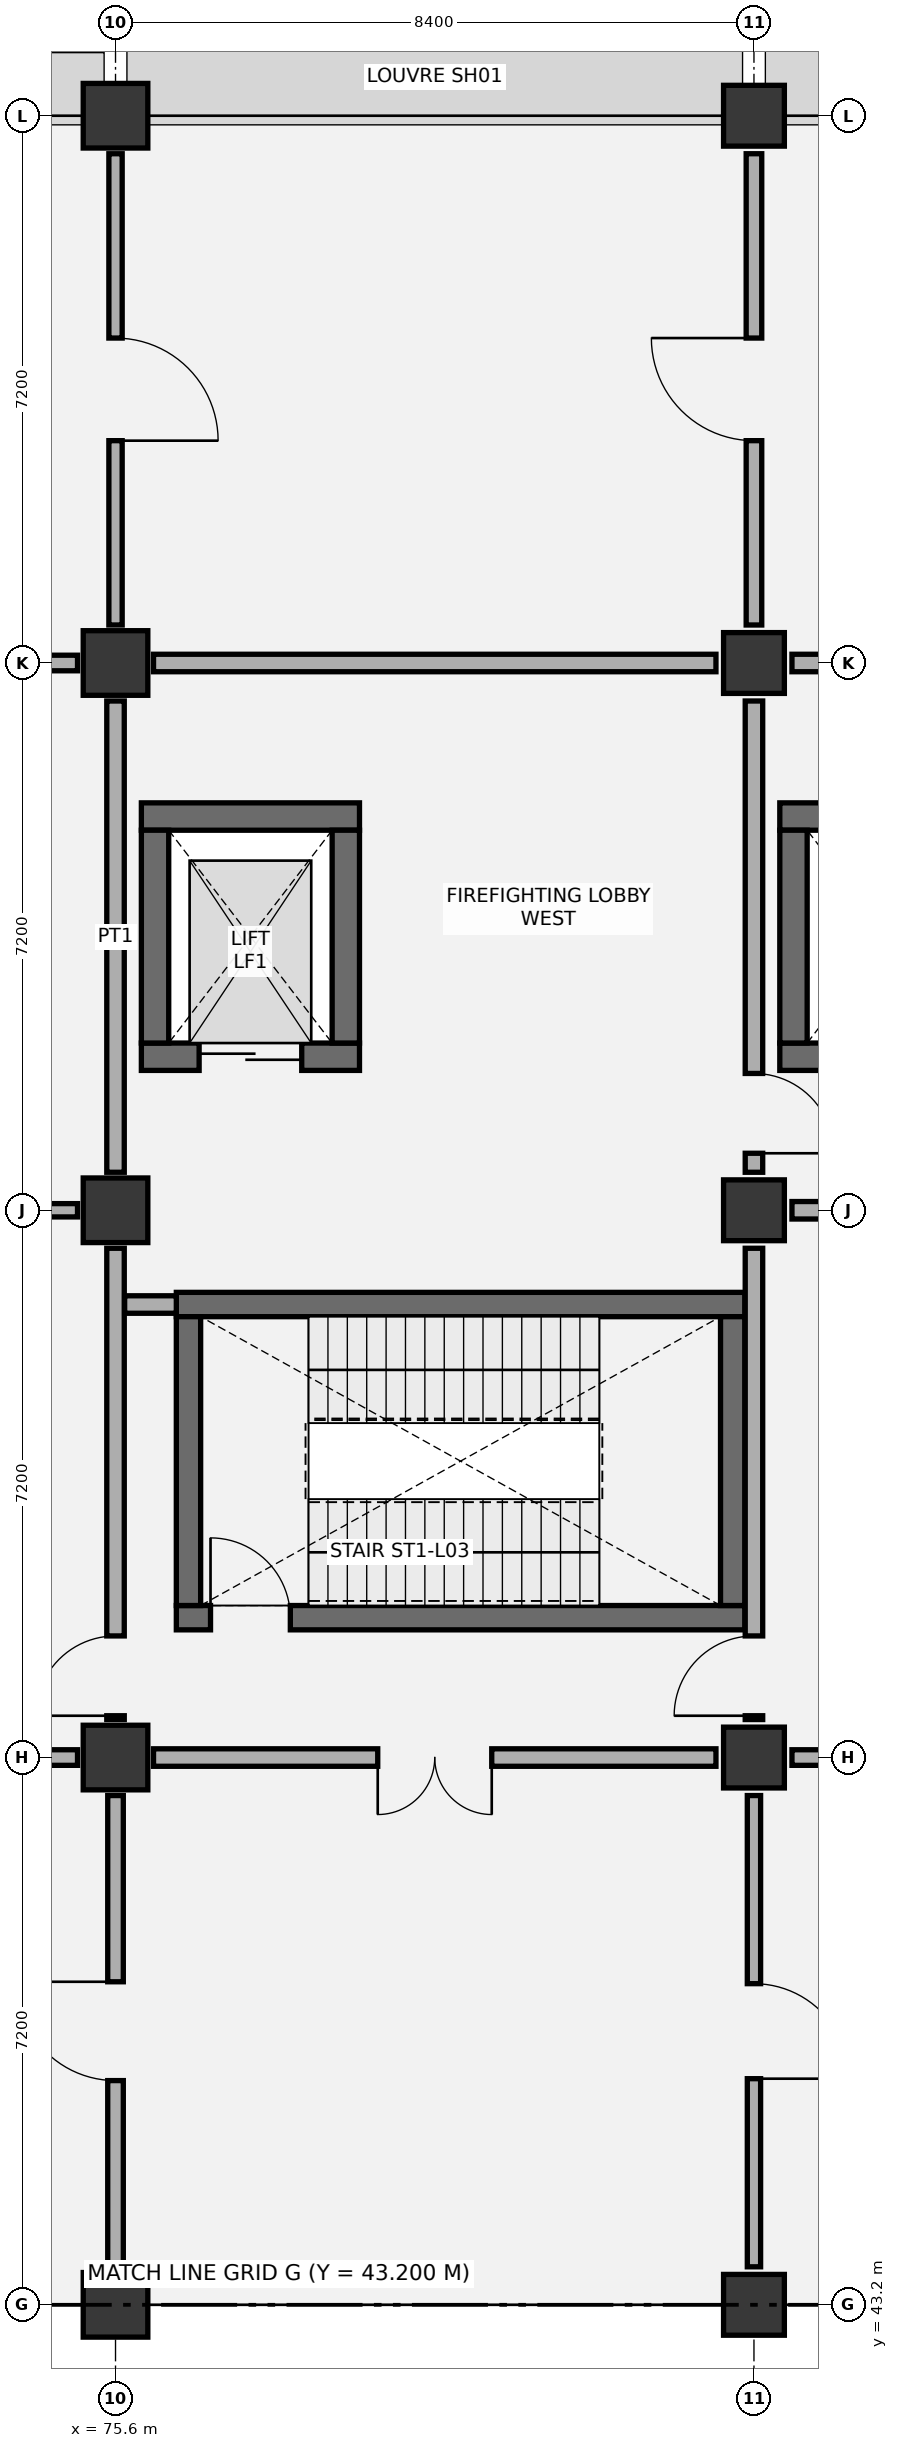
"""IFC4 building model, lengths in metres.
Left out: names, types, materials, properties, quantities, classifications, styles, units other than length and angle.
Written with IfcOpenShell. Run it as: python <this file> out.ifc"""

import sys

from ifc_helpers import new_model, si_unit, direction, frame, frame_2d, origin, origin_2d, place, context, subcontext, project, spatial, rectangle, extrude, element, fill, save


model = new_model("IFC4")
c1 = context("Model", 3, precision=1e-05, world=origin(), true_north=direction((0.0, 1.0)))
c2 = subcontext(c1, "Body", "Model", "MODEL_VIEW")
j1 = project(units=[si_unit("LENGTHUNIT", "METRE"), si_unit("PLANEANGLEUNIT", "RADIAN")], contexts=[c1])
p1 = place(None, origin())
s1 = spatial("IfcSite", under=j1, at=p1, CompositionType="ELEMENT")
p2 = place(p1, origin())
s2 = spatial("IfcBuilding", under=s1, at=p2, CompositionType="ELEMENT")
p3 = place(p2, frame((0.0, 0.0, 16.8)))
s3 = spatial("IfcBuildingStorey", under=s2, at=p3, CompositionType="ELEMENT", Elevation=16.8)
for number, where, z_axis, x_axis in (
    (1, (75.6, 43.2, 0.0), (0.0, 0.0, 1.0), (1.0, 0.0, 0.0)),
    (2, (75.6, 50.4, 0.0), (0.0, 0.0, 1.0), (1.0, 0.0, 0.0)),
    (3, (75.6, 57.6, 0.0), (0.0, 0.0, 1.0), (1.0, 0.0, 0.0)),
    (4, (75.6, 64.8, 0.0), (0.0, 0.0, 1.0), (1.0, 0.0, 0.0)),
    (5, (75.6, 72.0, 0.0), (0.0, 0.0, 1.0), (1.0, 0.0, 0.0)),
):
    element("IfcColumn", number, at=place(p3, frame(where, z_axis=z_axis, x_axis=x_axis)), inside=s3, PredefinedType="COLUMN", context=c2, shape_type="SweptSolid", body=[
        extrude(rectangle(XDim=0.85, YDim=0.85, at=origin_2d()), origin(), (0.0, 0.0, 1.0), 5.4),
    ])
for number, where, z_axis, x_axis in (
    (6, (84.0, 43.2, 0.0), (0.0, 0.0, 1.0), (1.0, 0.0, 0.0)),
    (7, (84.0, 50.4, 0.0), (0.0, 0.0, 1.0), (1.0, 0.0, 0.0)),
    (8, (84.0, 57.6, 0.0), (0.0, 0.0, 1.0), (1.0, 0.0, 0.0)),
    (9, (84.0, 64.8, 0.0), (0.0, 0.0, 1.0), (1.0, 0.0, 0.0)),
    (10, (84.0, 72.0, 0.0), (0.0, 0.0, 1.0), (1.0, 0.0, 0.0)),
):
    element("IfcColumn", number, at=place(p3, frame(where, z_axis=z_axis, x_axis=x_axis)), inside=s3, PredefinedType="COLUMN", context=c2, shape_type="SweptSolid", body=[
        extrude(rectangle(XDim=0.8, YDim=0.8, at=origin_2d()), origin(), (0.0, 0.0, 1.0), 5.4),
    ])
p4 = place(p3, frame((76.4, 52.24, 0.0), z_axis=(0.0, 0.0, 1.0), x_axis=(1.0, 0.0, 0.0)))
e11 = element("IfcWall", 11, at=p4, inside=s3, PredefinedType="SHEAR", context=c2, shape_type="SweptSolid", body=[
    extrude(rectangle(XDim=7.48, YDim=0.32, at=frame_2d((3.74, 0.0))), origin(), (0.0, 0.0, 1.0), 4.95),
])
p5 = place(p4, frame((0.45, 0.0, 0.0)))
e12 = element("IfcOpeningElement", 12, at=p5, cuts=e11, PredefinedType="OPENING", context=c2, shape_type="SweptSolid", body=[
    extrude(rectangle(XDim=1.05, YDim=2.15, at=frame_2d((0.525, 1.075))), frame((0.0, 0.17, 0.0), z_axis=(0.0, -1.0, 0.0), x_axis=(1.0, 0.0, 0.0)), (0.0, 0.0, 1.0), 0.34),
])
p6 = place(p3, frame((76.4, 56.36, 0.0), z_axis=(0.0, 0.0, 1.0), x_axis=(1.0, 0.0, 0.0)))
e13 = element("IfcWall", 13, at=p6, inside=s3, PredefinedType="SHEAR", context=c2, shape_type="SweptSolid", body=[
    extrude(rectangle(XDim=7.48, YDim=0.32, at=frame_2d((3.74, 0.0))), origin(), (0.0, 0.0, 1.0), 4.95),
])
for number, where, z_axis, x_axis in (
    (14, (76.56, 52.4, 0.0), (0.0, 0.0, 1.0), (0.0, 1.0, 0.0)),
    (15, (83.72, 52.4, 0.0), (0.0, 0.0, 1.0), (0.0, 1.0, 0.0)),
):
    element("IfcWall", number, at=place(p3, frame(where, z_axis=z_axis, x_axis=x_axis)), inside=s3, PredefinedType="SHEAR", context=c2, shape_type="SweptSolid", body=[
        extrude(rectangle(XDim=3.8, YDim=0.32, at=frame_2d((1.9, 0.0))), origin(), (0.0, 0.0, 1.0), 4.95),
    ])
p7 = place(p3, frame((75.94, 62.78, 0.0), z_axis=(0.0, 0.0, 1.0), x_axis=(1.0, 0.0, 0.0)))
e16 = element("IfcWall", 16, at=p7, inside=s3, PredefinedType="SHEAR", context=c2, shape_type="SweptSolid", body=[
    extrude(rectangle(XDim=2.87, YDim=0.36, at=frame_2d((1.435, 0.0))), origin(), (0.0, 0.0, 1.0), 4.95),
])
p8 = place(p3, frame((75.94, 59.62, 0.0), z_axis=(0.0, 0.0, 1.0), x_axis=(1.0, 0.0, 0.0)))
e17 = element("IfcWall", 17, at=p8, inside=s3, PredefinedType="SHEAR", context=c2, shape_type="SweptSolid", body=[
    extrude(rectangle(XDim=2.87, YDim=0.36, at=frame_2d((1.435, 0.0))), origin(), (0.0, 0.0, 1.0), 4.95),
])
p9 = place(p8, frame((0.76, 0.0, 0.0)))
e18 = element("IfcOpeningElement", 18, at=p9, cuts=e17, PredefinedType="OPENING", context=c2, shape_type="SweptSolid", body=[
    extrude(rectangle(XDim=1.35, YDim=2.2, at=frame_2d((0.675, 1.1))), frame((0.0, 0.19, 0.0), z_axis=(0.0, -1.0, 0.0), x_axis=(1.0, 0.0, 0.0)), (0.0, 0.0, 1.0), 0.38),
])
for number, where, z_axis, x_axis in (
    (19, (76.12, 59.8, 0.0), (0.0, 0.0, 1.0), (0.0, 1.0, 0.0)),
    (20, (78.63, 59.8, 0.0), (0.0, 0.0, 1.0), (0.0, 1.0, 0.0)),
):
    element("IfcWall", number, at=place(p3, frame(where, z_axis=z_axis, x_axis=x_axis)), inside=s3, PredefinedType="SHEAR", context=c2, shape_type="SweptSolid", body=[
        extrude(rectangle(XDim=2.8, YDim=0.36, at=frame_2d((1.4, 0.0))), origin(), (0.0, 0.0, 1.0), 4.95),
    ])
p10 = place(p3, frame((84.34, 62.78, 0.0), z_axis=(0.0, 0.0, 1.0), x_axis=(1.0, 0.0, 0.0)))
e21 = element("IfcWall", 21, at=p10, inside=s3, PredefinedType="SHEAR", context=c2, shape_type="SweptSolid", body=[
    extrude(rectangle(XDim=7.77, YDim=0.36, at=frame_2d((3.885, 0.0))), origin(), (0.0, 0.0, 1.0), 4.95),
])
p11 = place(p3, frame((84.34, 59.62, 0.0), z_axis=(0.0, 0.0, 1.0), x_axis=(1.0, 0.0, 0.0)))
e22 = element("IfcWall", 22, at=p11, inside=s3, PredefinedType="SHEAR", context=c2, shape_type="SweptSolid", body=[
    extrude(rectangle(XDim=2.66, YDim=0.36, at=frame_2d((1.33, 0.0))), origin(), (0.0, 0.0, 1.0), 4.95),
])
p12 = place(p11, frame((0.78, 0.0, 0.0)))
e23 = element("IfcOpeningElement", 23, at=p12, cuts=e22, PredefinedType="OPENING", context=c2, shape_type="SweptSolid", body=[
    extrude(rectangle(XDim=1.1, YDim=2.15, at=frame_2d((0.55, 1.075))), frame((0.0, 0.19, 0.0), z_axis=(0.0, -1.0, 0.0), x_axis=(1.0, 0.0, 0.0)), (0.0, 0.0, 1.0), 0.38),
])
p13 = place(p3, frame((84.52, 59.8, 0.0), z_axis=(0.0, 0.0, 1.0), x_axis=(0.0, 1.0, 0.0)))
e24 = element("IfcWall", 24, at=p13, inside=s3, PredefinedType="SHEAR", context=c2, shape_type="SweptSolid", body=[
    extrude(rectangle(XDim=2.8, YDim=0.36, at=frame_2d((1.4, 0.0))), origin(), (0.0, 0.0, 1.0), 4.95),
])
p14 = place(p3, frame((75.6, 43.7, 0.0), z_axis=(0.0, 0.0, 1.0), x_axis=(0.0, 1.0, 0.0)))
e25 = element("IfcWall", 25, at=p14, inside=s3, PredefinedType="PARTITIONING", context=c2, shape_type="SweptSolid", body=[
    extrude(rectangle(XDim=6.2, YDim=0.205, at=frame_2d((3.1, 0.0))), origin(), (0.0, 0.0, 1.0), 4.545),
])
p15 = place(p14, frame((2.45, 0.0, 0.0)))
e26 = element("IfcOpeningElement", 26, at=p15, cuts=e25, PredefinedType="OPENING", context=c2, shape_type="SweptSolid", body=[
    extrude(rectangle(XDim=1.3, YDim=2.15, at=frame_2d((0.65, 1.075))), frame((0.0, 0.113, 0.0), z_axis=(0.0, -1.0, 0.0), x_axis=(1.0, 0.0, 0.0)), (0.0, 0.0, 1.0), 0.225),
])
p16 = place(p3, frame((67.7, 50.4, 0.0), z_axis=(0.0, 0.0, 1.0), x_axis=(1.0, 0.0, 0.0)))
e27 = element("IfcWall", 27, at=p16, inside=s3, PredefinedType="PARTITIONING", context=c2, shape_type="SweptSolid", body=[
    extrude(rectangle(XDim=7.4, YDim=0.205, at=frame_2d((3.7, 0.0))), origin(), (0.0, 0.0, 1.0), 4.195),
])
p17 = place(p3, frame((75.6, 50.9, 0.0), z_axis=(0.0, 0.0, 1.0), x_axis=(0.0, 1.0, 0.0)))
e28 = element("IfcWall", 28, at=p17, inside=s3, PredefinedType="PARTITIONING", context=c2, shape_type="SweptSolid", body=[
    extrude(rectangle(XDim=6.2, YDim=0.23, at=frame_2d((3.1, 0.0))), origin(), (0.0, 0.0, 1.0), 4.245),
])
p18 = place(p17, frame((0.05, 0.0, 0.0)))
e29 = element("IfcOpeningElement", 29, at=p18, cuts=e28, PredefinedType="OPENING", context=c2, shape_type="SweptSolid", body=[
    extrude(rectangle(XDim=1.05, YDim=2.15, at=frame_2d((0.525, 1.075))), frame((0.0, 0.125, 0.0), z_axis=(0.0, -1.0, 0.0), x_axis=(1.0, 0.0, 0.0)), (0.0, 0.0, 1.0), 0.25),
])
p19 = place(p3, frame((67.7, 57.6, 0.0), z_axis=(0.0, 0.0, 1.0), x_axis=(1.0, 0.0, 0.0)))
e30 = element("IfcWall", 30, at=p19, inside=s3, PredefinedType="PARTITIONING", context=c2, shape_type="SweptSolid", body=[
    extrude(rectangle(XDim=7.4, YDim=0.175, at=frame_2d((3.7, 0.0))), origin(), (0.0, 0.0, 1.0), 4.195),
])
p20 = place(p3, frame((75.6, 58.1, 0.0), z_axis=(0.0, 0.0, 1.0), x_axis=(0.0, 1.0, 0.0)))
e31 = element("IfcWall", 31, at=p20, inside=s3, PredefinedType="PARTITIONING", context=c2, shape_type="SweptSolid", body=[
    extrude(rectangle(XDim=6.2, YDim=0.23, at=frame_2d((3.1, 0.0))), origin(), (0.0, 0.0, 1.0), 4.655),
])
p21 = place(p3, frame((67.7, 64.8, 0.0), z_axis=(0.0, 0.0, 1.0), x_axis=(1.0, 0.0, 0.0)))
e32 = element("IfcWall", 32, at=p21, inside=s3, PredefinedType="PARTITIONING", context=c2, shape_type="SweptSolid", body=[
    extrude(rectangle(XDim=7.4, YDim=0.205, at=frame_2d((3.7, 0.0))), origin(), (0.0, 0.0, 1.0), 4.195),
])
p22 = place(p3, frame((75.6, 65.3, 0.0), z_axis=(0.0, 0.0, 1.0), x_axis=(0.0, 1.0, 0.0)))
e33 = element("IfcWall", 33, at=p22, inside=s3, PredefinedType="PARTITIONING", context=c2, shape_type="SweptSolid", body=[
    extrude(rectangle(XDim=6.2, YDim=0.175, at=frame_2d((3.1, 0.0))), origin(), (0.0, 0.0, 1.0), 4.245),
])
p23 = place(p22, frame((2.425, 0.0, 0.0)))
e34 = element("IfcOpeningElement", 34, at=p23, cuts=e33, PredefinedType="OPENING", context=c2, shape_type="SweptSolid", body=[
    extrude(rectangle(XDim=1.35, YDim=2.15, at=frame_2d((0.675, 1.075))), frame((0.0, 0.097, 0.0), z_axis=(0.0, -1.0, 0.0), x_axis=(1.0, 0.0, 0.0)), (0.0, 0.0, 1.0), 0.195),
])
p24 = place(p3, frame((84.0, 43.7, 0.0), z_axis=(0.0, 0.0, 1.0), x_axis=(0.0, 1.0, 0.0)))
e35 = element("IfcWall", 35, at=p24, inside=s3, PredefinedType="PARTITIONING", context=c2, shape_type="SweptSolid", body=[
    extrude(rectangle(XDim=6.2, YDim=0.175, at=frame_2d((3.1, 0.0))), origin(), (0.0, 0.0, 1.0), 4.245),
])
p25 = place(p24, frame((2.475, 0.0, 0.0)))
e36 = element("IfcOpeningElement", 36, at=p25, cuts=e35, PredefinedType="OPENING", context=c2, shape_type="SweptSolid", body=[
    extrude(rectangle(XDim=1.25, YDim=2.1, at=frame_2d((0.625, 1.05))), frame((0.0, 0.097, 0.0), z_axis=(0.0, -1.0, 0.0), x_axis=(1.0, 0.0, 0.0)), (0.0, 0.0, 1.0), 0.195),
])
p26 = place(p3, frame((76.1, 50.4, 0.0), z_axis=(0.0, 0.0, 1.0), x_axis=(1.0, 0.0, 0.0)))
e37 = element("IfcWall", 37, at=p26, inside=s3, PredefinedType="PARTITIONING", context=c2, shape_type="SweptSolid", body=[
    extrude(rectangle(XDim=7.4, YDim=0.23, at=frame_2d((3.7, 0.0))), origin(), (0.0, 0.0, 1.0), 4.195),
])
p27 = place(p26, frame((2.95, 0.0, 0.0)))
e38 = element("IfcOpeningElement", 38, at=p27, cuts=e37, PredefinedType="OPENING", context=c2, shape_type="SweptSolid", body=[
    extrude(rectangle(XDim=1.5, YDim=2.15, at=frame_2d((0.75, 1.075))), frame((0.0, 0.125, 0.0), z_axis=(0.0, -1.0, 0.0), x_axis=(1.0, 0.0, 0.0)), (0.0, 0.0, 1.0), 0.25),
])
p28 = place(p3, frame((84.0, 50.9, 0.0), z_axis=(0.0, 0.0, 1.0), x_axis=(0.0, 1.0, 0.0)))
e39 = element("IfcWall", 39, at=p28, inside=s3, PredefinedType="PARTITIONING", context=c2, shape_type="SweptSolid", body=[
    extrude(rectangle(XDim=6.2, YDim=0.23, at=frame_2d((3.1, 0.0))), origin(), (0.0, 0.0, 1.0), 4.655),
])
p29 = place(p28, frame((0.05, 0.0, 0.0)))
e40 = element("IfcOpeningElement", 40, at=p29, cuts=e39, PredefinedType="OPENING", context=c2, shape_type="SweptSolid", body=[
    extrude(rectangle(XDim=1.05, YDim=2.15, at=frame_2d((0.525, 1.075))), frame((0.0, 0.125, 0.0), z_axis=(0.0, -1.0, 0.0), x_axis=(1.0, 0.0, 0.0)), (0.0, 0.0, 1.0), 0.25),
])
p30 = place(p3, frame((75.72, 56.36, 0.0), z_axis=(0.0, 0.0, 1.0), x_axis=(1.0, 0.0, 0.0)))
e41 = element("IfcWall", 41, at=p30, inside=s3, PredefinedType="PARTITIONING", context=c2, shape_type="SweptSolid", body=[
    extrude(rectangle(XDim=0.68, YDim=0.23, at=frame_2d((0.34, 0.0))), origin(), (0.0, 0.0, 1.0), 4.95),
])
p31 = place(p3, frame((84.0, 58.1, 0.0), z_axis=(0.0, 0.0, 1.0), x_axis=(0.0, 1.0, 0.0)))
e42 = element("IfcWall", 42, at=p31, inside=s3, PredefinedType="PARTITIONING", context=c2, shape_type="SweptSolid", body=[
    extrude(rectangle(XDim=6.2, YDim=0.23, at=frame_2d((3.1, 0.0))), origin(), (0.0, 0.0, 1.0), 4.245),
])
p32 = place(p31, frame((0.25, 0.0, 0.0)))
e43 = element("IfcOpeningElement", 43, at=p32, cuts=e42, PredefinedType="OPENING", context=c2, shape_type="SweptSolid", body=[
    extrude(rectangle(XDim=1.05, YDim=2.15, at=frame_2d((0.525, 1.075))), frame((0.0, 0.125, 0.0), z_axis=(0.0, -1.0, 0.0), x_axis=(1.0, 0.0, 0.0)), (0.0, 0.0, 1.0), 0.25),
])
p33 = place(p3, frame((76.1, 64.8, 0.0), z_axis=(0.0, 0.0, 1.0), x_axis=(1.0, 0.0, 0.0)))
e44 = element("IfcWall", 44, at=p33, inside=s3, PredefinedType="PARTITIONING", context=c2, shape_type="SweptSolid", body=[
    extrude(rectangle(XDim=7.4, YDim=0.23, at=frame_2d((3.7, 0.0))), origin(), (0.0, 0.0, 1.0), 4.195),
])
p34 = place(p3, frame((84.0, 65.3, 0.0), z_axis=(0.0, 0.0, 1.0), x_axis=(0.0, 1.0, 0.0)))
e45 = element("IfcWall", 45, at=p34, inside=s3, PredefinedType="PARTITIONING", context=c2, shape_type="SweptSolid", body=[
    extrude(rectangle(XDim=6.2, YDim=0.205, at=frame_2d((3.1, 0.0))), origin(), (0.0, 0.0, 1.0), 4.445),
])
p35 = place(p34, frame((2.425, 0.0, 0.0)))
e46 = element("IfcOpeningElement", 46, at=p35, cuts=e45, PredefinedType="OPENING", context=c2, shape_type="SweptSolid", body=[
    extrude(rectangle(XDim=1.35, YDim=2.15, at=frame_2d((0.675, 1.075))), frame((0.0, 0.113, 0.0), z_axis=(0.0, -1.0, 0.0), x_axis=(1.0, 0.0, 0.0)), (0.0, 0.0, 1.0), 0.225),
])
p36 = place(p3, frame((84.5, 50.4, 0.0), z_axis=(0.0, 0.0, 1.0), x_axis=(1.0, 0.0, 0.0)))
e47 = element("IfcWall", 47, at=p36, inside=s3, PredefinedType="PARTITIONING", context=c2, shape_type="SweptSolid", body=[
    extrude(rectangle(XDim=7.4, YDim=0.205, at=frame_2d((3.7, 0.0))), origin(), (0.0, 0.0, 1.0), 4.195),
])
p37 = place(p36, frame((2.95, 0.0, 0.0)))
e48 = element("IfcOpeningElement", 48, at=p37, cuts=e47, PredefinedType="OPENING", context=c2, shape_type="SweptSolid", body=[
    extrude(rectangle(XDim=1.5, YDim=2.2, at=frame_2d((0.75, 1.1))), frame((0.0, 0.113, 0.0), z_axis=(0.0, -1.0, 0.0), x_axis=(1.0, 0.0, 0.0)), (0.0, 0.0, 1.0), 0.225),
])
p38 = place(p3, frame((84.5, 57.6, 0.0), z_axis=(0.0, 0.0, 1.0), x_axis=(1.0, 0.0, 0.0)))
e49 = element("IfcWall", 49, at=p38, inside=s3, PredefinedType="PARTITIONING", context=c2, shape_type="SweptSolid", body=[
    extrude(rectangle(XDim=7.4, YDim=0.23, at=frame_2d((3.7, 0.0))), origin(), (0.0, 0.0, 1.0), 4.195),
])
p39 = place(p38, frame((2.95, 0.0, 0.0)))
e50 = element("IfcOpeningElement", 50, at=p39, cuts=e49, PredefinedType="OPENING", context=c2, shape_type="SweptSolid", body=[
    extrude(rectangle(XDim=1.5, YDim=2.15, at=frame_2d((0.75, 1.075))), frame((0.0, 0.125, 0.0), z_axis=(0.0, -1.0, 0.0), x_axis=(1.0, 0.0, 0.0)), (0.0, 0.0, 1.0), 0.25),
])
p40 = place(p3, frame((84.5, 64.8, 0.0), z_axis=(0.0, 0.0, 1.0), x_axis=(1.0, 0.0, 0.0)))
e51 = element("IfcWall", 51, at=p40, inside=s3, PredefinedType="PARTITIONING", context=c2, shape_type="SweptSolid", body=[
    extrude(rectangle(XDim=7.4, YDim=0.23, at=frame_2d((3.7, 0.0))), origin(), (0.0, 0.0, 1.0), 4.195),
])
p41 = place(p5, origin())
e52 = element("IfcDoor", 52, at=p41, inside=s3, OperationType="SINGLE_SWING_LEFT", PredefinedType="DOOR", context=c2, shape_type="SweptSolid", body=[
    extrude(rectangle(XDim=1.05, YDim=2.15, at=frame_2d((0.525, 1.075))), frame((0.0, 0.025, 0.0), z_axis=(0.0, -1.0, 0.0), x_axis=(1.0, 0.0, 0.0)), (0.0, 0.0, 1.0), 0.05),
])
fill(e12, e52)
p42 = place(p9, origin())
e53 = element("IfcDoor", 53, at=p42, inside=s3, OperationType="DOUBLE_DOOR_SLIDING", PredefinedType="DOOR", context=c2, shape_type="SweptSolid", body=[
    extrude(rectangle(XDim=1.35, YDim=2.2, at=frame_2d((0.675, 1.1))), frame((0.0, 0.025, 0.0), z_axis=(0.0, -1.0, 0.0), x_axis=(1.0, 0.0, 0.0)), (0.0, 0.0, 1.0), 0.05),
])
fill(e18, e53)
p43 = place(p15, origin())
e54 = element("IfcDoor", 54, at=p43, inside=s3, OperationType="SINGLE_SWING_RIGHT", PredefinedType="DOOR", context=c2, shape_type="SweptSolid", body=[
    extrude(rectangle(XDim=1.3, YDim=2.15, at=frame_2d((0.65, 1.075))), frame((0.0, 0.025, 0.0), z_axis=(0.0, -1.0, 0.0), x_axis=(1.0, 0.0, 0.0)), (0.0, 0.0, 1.0), 0.05),
])
fill(e26, e54)
p44 = place(p18, origin())
e55 = element("IfcDoor", 55, at=p44, inside=s3, OperationType="SINGLE_SWING_LEFT", PredefinedType="DOOR", context=c2, shape_type="SweptSolid", body=[
    extrude(rectangle(XDim=1.05, YDim=2.15, at=frame_2d((0.525, 1.075))), frame((0.0, 0.025, 0.0), z_axis=(0.0, -1.0, 0.0), x_axis=(1.0, 0.0, 0.0)), (0.0, 0.0, 1.0), 0.05),
])
fill(e29, e55)
p45 = place(p23, frame((1.35, 0.0, 0.0), z_axis=(0.0, 0.0, 1.0), x_axis=(-1.0, 0.0, 0.0)))
e56 = element("IfcDoor", 56, at=p45, inside=s3, OperationType="SINGLE_SWING_RIGHT", PredefinedType="DOOR", context=c2, shape_type="SweptSolid", body=[
    extrude(rectangle(XDim=1.35, YDim=2.15, at=frame_2d((0.675, 1.075))), frame((0.0, 0.025, 0.0), z_axis=(0.0, -1.0, 0.0), x_axis=(1.0, 0.0, 0.0)), (0.0, 0.0, 1.0), 0.05),
])
fill(e34, e56)
p46 = place(p25, frame((1.25, 0.0, 0.0), z_axis=(0.0, 0.0, 1.0), x_axis=(-1.0, 0.0, 0.0)))
e57 = element("IfcDoor", 57, at=p46, inside=s3, OperationType="SINGLE_SWING_RIGHT", PredefinedType="DOOR", context=c2, shape_type="SweptSolid", body=[
    extrude(rectangle(XDim=1.25, YDim=2.1, at=frame_2d((0.625, 1.05))), frame((0.0, 0.025, 0.0), z_axis=(0.0, -1.0, 0.0), x_axis=(1.0, 0.0, 0.0)), (0.0, 0.0, 1.0), 0.05),
])
fill(e36, e57)
p47 = place(p27, frame((1.5, 0.0, 0.0), z_axis=(0.0, 0.0, 1.0), x_axis=(-1.0, 0.0, 0.0)))
e58 = element("IfcDoor", 58, at=p47, inside=s3, OperationType="DOUBLE_DOOR_SINGLE_SWING", PredefinedType="DOOR", context=c2, shape_type="SweptSolid", body=[
    extrude(rectangle(XDim=1.5, YDim=2.15, at=frame_2d((0.75, 1.075))), frame((0.0, 0.025, 0.0), z_axis=(0.0, -1.0, 0.0), x_axis=(1.0, 0.0, 0.0)), (0.0, 0.0, 1.0), 0.05),
])
fill(e38, e58)
p48 = place(p29, origin())
e59 = element("IfcDoor", 59, at=p48, inside=s3, OperationType="SINGLE_SWING_LEFT", PredefinedType="DOOR", context=c2, shape_type="SweptSolid", body=[
    extrude(rectangle(XDim=1.05, YDim=2.15, at=frame_2d((0.525, 1.075))), frame((0.0, 0.025, 0.0), z_axis=(0.0, -1.0, 0.0), x_axis=(1.0, 0.0, 0.0)), (0.0, 0.0, 1.0), 0.05),
])
fill(e40, e59)
p49 = place(p32, frame((1.05, 0.0, 0.0), z_axis=(0.0, 0.0, 1.0), x_axis=(-1.0, 0.0, 0.0)))
e60 = element("IfcDoor", 60, at=p49, inside=s3, OperationType="SINGLE_SWING_RIGHT", PredefinedType="DOOR", context=c2, shape_type="SweptSolid", body=[
    extrude(rectangle(XDim=1.05, YDim=2.15, at=frame_2d((0.525, 1.075))), frame((0.0, 0.025, 0.0), z_axis=(0.0, -1.0, 0.0), x_axis=(1.0, 0.0, 0.0)), (0.0, 0.0, 1.0), 0.05),
])
fill(e43, e60)
p50 = place(p35, origin())
e61 = element("IfcDoor", 61, at=p50, inside=s3, OperationType="SINGLE_SWING_RIGHT", PredefinedType="DOOR", context=c2, shape_type="SweptSolid", body=[
    extrude(rectangle(XDim=1.35, YDim=2.15, at=frame_2d((0.675, 1.075))), frame((0.0, 0.025, 0.0), z_axis=(0.0, -1.0, 0.0), x_axis=(1.0, 0.0, 0.0)), (0.0, 0.0, 1.0), 0.05),
])
fill(e46, e61)
save(model, sys.argv[1])
